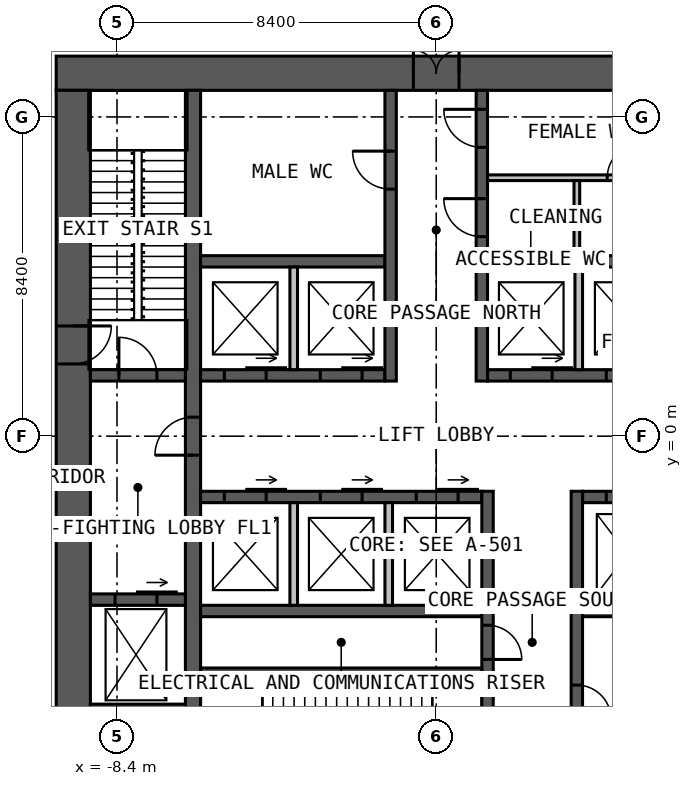
"""IFC4 building model, lengths in metres.
Left out: names, types, materials, properties, quantities, classifications, styles, units other than length and angle.
Written with IfcOpenShell. Run it as: python <this file> out.ifc"""

import sys

from ifc_helpers import new_model, si_unit, direction, frame, frame_2d, origin, place, context, subcontext, project, spatial, rectangle, extrude, element, fill, save


model = new_model("IFC4")
c1 = context("Model", 3, precision=1e-05, world=origin(), true_north=direction((0.0, 1.0)))
c2 = subcontext(c1, "Body", "Model", "MODEL_VIEW")
j1 = project(units=[si_unit("LENGTHUNIT", "METRE"), si_unit("PLANEANGLEUNIT", "RADIAN")], contexts=[c1])
p1 = place(None, origin())
s1 = spatial("IfcSite", under=j1, at=p1, CompositionType="ELEMENT")
p2 = place(p1, origin())
s2 = spatial("IfcBuilding", under=s1, at=p2, CompositionType="ELEMENT")
p3 = place(p2, origin())
s3 = spatial("IfcBuildingStorey", under=s2, at=p3, CompositionType="ELEMENT", Elevation=0.0)
p4 = place(p3, frame((-10.0, 9.55, 0.0), z_axis=(0.0, 0.0, 1.0), x_axis=(1.0, 0.0, 0.0)))
e1 = element("IfcWall", 1, at=p4, inside=s3, PredefinedType="SOLIDWALL", context=c2, shape_type="SweptSolid", body=[
    extrude(rectangle(XDim=20.0, YDim=0.9, at=frame_2d((10.0, 0.0))), origin(), (0.0, 0.0, 1.0), 6.0),
])
p5 = place(p4, frame((9.4, 0.0, 0.0)))
e2 = element("IfcOpeningElement", 2, at=p5, cuts=e1, PredefinedType="OPENING", context=c2, shape_type="SweptSolid", body=[
    extrude(rectangle(XDim=1.2, YDim=2.2, at=frame_2d((0.6, 1.1))), frame((0.0, 0.46, 0.0), z_axis=(0.0, -1.0, 0.0), x_axis=(1.0, 0.0, 0.0)), (0.0, 0.0, 1.0), 0.92),
])
p6 = place(p3, frame((-9.55, 9.1, 0.0), z_axis=(0.0, 0.0, 1.0), x_axis=(0.0, -1.0, 0.0)))
e3 = element("IfcWall", 3, at=p6, inside=s3, PredefinedType="SOLIDWALL", context=c2, shape_type="SweptSolid", body=[
    extrude(rectangle(XDim=18.2, YDim=0.9, at=frame_2d((9.1, 0.0))), origin(), (0.0, 0.0, 1.0), 6.0),
])
p7 = place(p6, frame((6.2, 0.0, 0.0)))
e4 = element("IfcOpeningElement", 4, at=p7, cuts=e3, PredefinedType="OPENING", context=c2, shape_type="SweptSolid", body=[
    extrude(rectangle(XDim=1.0, YDim=2.2, at=frame_2d((0.5, 1.1))), frame((0.0, 0.46, 0.0), z_axis=(0.0, -1.0, 0.0), x_axis=(1.0, 0.0, 0.0)), (0.0, 0.0, 1.0), 0.92),
])
p8 = place(p3, frame((-6.4, -9.1, 0.0), z_axis=(0.0, 0.0, 1.0), x_axis=(0.0, 1.0, 0.0)))
e5 = element("IfcWall", 5, at=p8, inside=s3, PredefinedType="SOLIDWALL", context=c2, shape_type="SweptSolid", body=[
    extrude(rectangle(XDim=18.2, YDim=0.4, at=frame_2d((9.1, 0.0))), origin(), (0.0, 0.0, 1.0), 6.0),
])
p9 = place(p8, frame((8.6, 0.0, 0.0)))
e6 = element("IfcOpeningElement", 6, at=p9, cuts=e5, PredefinedType="OPENING", context=c2, shape_type="SweptSolid", body=[
    extrude(rectangle(XDim=1.0, YDim=2.2, at=frame_2d((0.5, 1.1))), frame((0.0, 0.21, 0.0), z_axis=(0.0, -1.0, 0.0), x_axis=(1.0, 0.0, 0.0)), (0.0, 0.0, 1.0), 0.42),
])
p10 = place(p3, frame((-6.2, 1.6, 0.0), z_axis=(0.0, 0.0, 1.0), x_axis=(1.0, 0.0, 0.0)))
e7 = element("IfcWall", 7, at=p10, inside=s3, PredefinedType="SOLIDWALL", context=c2, shape_type="SweptSolid", body=[
    extrude(rectangle(XDim=4.85, YDim=0.3, at=frame_2d((2.425, 0.0))), origin(), (0.0, 0.0, 1.0), 6.0),
])
p11 = place(p10, frame((0.625, 0.0, 0.0)))
e8 = element("IfcOpeningElement", 8, at=p11, cuts=e7, PredefinedType="OPENING", context=c2, shape_type="SweptSolid", body=[
    extrude(rectangle(XDim=1.1, YDim=2.2, at=frame_2d((0.55, 1.1))), frame((0.0, 0.16, 0.0), z_axis=(0.0, -1.0, 0.0), x_axis=(1.0, 0.0, 0.0)), (0.0, 0.0, 1.0), 0.32),
])
p12 = place(p10, frame((3.15, 0.0, 0.0)))
e9 = element("IfcOpeningElement", 9, at=p12, cuts=e7, PredefinedType="OPENING", context=c2, shape_type="SweptSolid", body=[
    extrude(rectangle(XDim=1.1, YDim=2.2, at=frame_2d((0.55, 1.1))), frame((0.0, 0.16, 0.0), z_axis=(0.0, -1.0, 0.0), x_axis=(1.0, 0.0, 0.0)), (0.0, 0.0, 1.0), 0.32),
])
p13 = place(p3, frame((1.35, 1.6, 0.0), z_axis=(0.0, 0.0, 1.0), x_axis=(1.0, 0.0, 0.0)))
e10 = element("IfcWall", 10, at=p13, inside=s3, PredefinedType="SOLIDWALL", context=c2, shape_type="SweptSolid", body=[
    extrude(rectangle(XDim=4.85, YDim=0.3, at=frame_2d((2.425, 0.0))), origin(), (0.0, 0.0, 1.0), 6.0),
])
p14 = place(p13, frame((0.6, 0.0, 0.0)))
e11 = element("IfcOpeningElement", 11, at=p14, cuts=e10, PredefinedType="OPENING", context=c2, shape_type="SweptSolid", body=[
    extrude(rectangle(XDim=1.1, YDim=2.2, at=frame_2d((0.55, 1.1))), frame((0.0, 0.16, 0.0), z_axis=(0.0, -1.0, 0.0), x_axis=(1.0, 0.0, 0.0)), (0.0, 0.0, 1.0), 0.32),
])
p15 = place(p13, frame((3.125, 0.0, 0.0)))
e12 = element("IfcOpeningElement", 12, at=p15, cuts=e10, PredefinedType="OPENING", context=c2, shape_type="SweptSolid", body=[
    extrude(rectangle(XDim=1.1, YDim=2.2, at=frame_2d((0.55, 1.1))), frame((0.0, 0.16, 0.0), z_axis=(0.0, -1.0, 0.0), x_axis=(1.0, 0.0, 0.0)), (0.0, 0.0, 1.0), 0.32),
])
for number, where, z_axis, x_axis in (
    (13, (-6.2, 4.6, 0.0), (0.0, 0.0, 1.0), (1.0, 0.0, 0.0)),
    (14, (1.35, 4.6, 0.0), (0.0, 0.0, 1.0), (1.0, 0.0, 0.0)),
):
    element("IfcWall", number, at=place(p3, frame(where, z_axis=z_axis, x_axis=x_axis)), inside=s3, PredefinedType="SOLIDWALL", context=c2, shape_type="SweptSolid", body=[
        extrude(rectangle(XDim=4.85, YDim=0.3, at=frame_2d((2.425, 0.0))), origin(), (0.0, 0.0, 1.0), 6.0),
    ])
p16 = place(p3, frame((-1.2, 1.45, 0.0), z_axis=(0.0, 0.0, 1.0), x_axis=(0.0, 1.0, 0.0)))
e15 = element("IfcWall", 15, at=p16, inside=s3, PredefinedType="SOLIDWALL", context=c2, shape_type="SweptSolid", body=[
    extrude(rectangle(XDim=7.65, YDim=0.3, at=frame_2d((3.825, 0.0))), origin(), (0.0, 0.0, 1.0), 6.0),
])
p17 = place(p16, frame((5.05, 0.0, 0.0)))
e16 = element("IfcOpeningElement", 16, at=p17, cuts=e15, PredefinedType="OPENING", context=c2, shape_type="SweptSolid", body=[
    extrude(rectangle(XDim=1.0, YDim=2.2, at=frame_2d((0.5, 1.1))), frame((0.0, 0.16, 0.0), z_axis=(0.0, -1.0, 0.0), x_axis=(1.0, 0.0, 0.0)), (0.0, 0.0, 1.0), 0.32),
])
p18 = place(p3, frame((1.2, 1.45, 0.0), z_axis=(0.0, 0.0, 1.0), x_axis=(0.0, 1.0, 0.0)))
e17 = element("IfcWall", 17, at=p18, inside=s3, PredefinedType="SOLIDWALL", context=c2, shape_type="SweptSolid", body=[
    extrude(rectangle(XDim=7.65, YDim=0.3, at=frame_2d((3.825, 0.0))), origin(), (0.0, 0.0, 1.0), 6.0),
])
p19 = place(p18, frame((3.8, 0.0, 0.0)))
e18 = element("IfcOpeningElement", 18, at=p19, cuts=e17, PredefinedType="OPENING", context=c2, shape_type="SweptSolid", body=[
    extrude(rectangle(XDim=1.0, YDim=2.2, at=frame_2d((0.5, 1.1))), frame((0.0, 0.16, 0.0), z_axis=(0.0, -1.0, 0.0), x_axis=(1.0, 0.0, 0.0)), (0.0, 0.0, 1.0), 0.32),
])
p20 = place(p18, frame((6.15, 0.0, 0.0)))
e19 = element("IfcOpeningElement", 19, at=p20, cuts=e17, PredefinedType="OPENING", context=c2, shape_type="SweptSolid", body=[
    extrude(rectangle(XDim=1.0, YDim=2.2, at=frame_2d((0.5, 1.1))), frame((0.0, 0.16, 0.0), z_axis=(0.0, -1.0, 0.0), x_axis=(1.0, 0.0, 0.0)), (0.0, 0.0, 1.0), 0.32),
])
p21 = place(p3, frame((-6.2, -1.6, 0.0), z_axis=(0.0, 0.0, 1.0), x_axis=(1.0, 0.0, 0.0)))
e20 = element("IfcWall", 20, at=p21, inside=s3, PredefinedType="SOLIDWALL", context=c2, shape_type="SweptSolid", body=[
    extrude(rectangle(XDim=7.4, YDim=0.3, at=frame_2d((3.7, 0.0))), origin(), (0.0, 0.0, 1.0), 6.0),
])
p22 = place(p21, frame((0.625, 0.0, 0.0)))
e21 = element("IfcOpeningElement", 21, at=p22, cuts=e20, PredefinedType="OPENING", context=c2, shape_type="SweptSolid", body=[
    extrude(rectangle(XDim=1.1, YDim=2.2, at=frame_2d((0.55, 1.1))), frame((0.0, 0.16, 0.0), z_axis=(0.0, -1.0, 0.0), x_axis=(1.0, 0.0, 0.0)), (0.0, 0.0, 1.0), 0.32),
])
p23 = place(p21, frame((3.15, 0.0, 0.0)))
e22 = element("IfcOpeningElement", 22, at=p23, cuts=e20, PredefinedType="OPENING", context=c2, shape_type="SweptSolid", body=[
    extrude(rectangle(XDim=1.1, YDim=2.2, at=frame_2d((0.55, 1.1))), frame((0.0, 0.16, 0.0), z_axis=(0.0, -1.0, 0.0), x_axis=(1.0, 0.0, 0.0)), (0.0, 0.0, 1.0), 0.32),
])
p24 = place(p21, frame((5.675, 0.0, 0.0)))
e23 = element("IfcOpeningElement", 23, at=p24, cuts=e20, PredefinedType="OPENING", context=c2, shape_type="SweptSolid", body=[
    extrude(rectangle(XDim=1.1, YDim=2.2, at=frame_2d((0.55, 1.1))), frame((0.0, 0.16, 0.0), z_axis=(0.0, -1.0, 0.0), x_axis=(1.0, 0.0, 0.0)), (0.0, 0.0, 1.0), 0.32),
])
p25 = place(p3, frame((3.85, -1.6, 0.0), z_axis=(0.0, 0.0, 1.0), x_axis=(1.0, 0.0, 0.0)))
e24 = element("IfcWall", 24, at=p25, inside=s3, PredefinedType="SOLIDWALL", context=c2, shape_type="SweptSolid", body=[
    extrude(rectangle(XDim=2.35, YDim=0.3, at=frame_2d((1.175, 0.0))), origin(), (0.0, 0.0, 1.0), 6.0),
])
p26 = place(p25, frame((0.625, 0.0, 0.0)))
e25 = element("IfcOpeningElement", 25, at=p26, cuts=e24, PredefinedType="OPENING", context=c2, shape_type="SweptSolid", body=[
    extrude(rectangle(XDim=1.1, YDim=2.2, at=frame_2d((0.55, 1.1))), frame((0.0, 0.16, 0.0), z_axis=(0.0, -1.0, 0.0), x_axis=(1.0, 0.0, 0.0)), (0.0, 0.0, 1.0), 0.32),
])
p27 = place(p3, frame((-6.2, -4.6, 0.0), z_axis=(0.0, 0.0, 1.0), x_axis=(1.0, 0.0, 0.0)))
e26 = element("IfcWall", 26, at=p27, inside=s3, PredefinedType="SOLIDWALL", context=c2, shape_type="SweptSolid", body=[
    extrude(rectangle(XDim=7.4, YDim=0.3, at=frame_2d((3.7, 0.0))), origin(), (0.0, 0.0, 1.0), 6.0),
])
p28 = place(p3, frame((3.85, -4.6, 0.0), z_axis=(0.0, 0.0, 1.0), x_axis=(1.0, 0.0, 0.0)))
e27 = element("IfcWall", 27, at=p28, inside=s3, PredefinedType="SOLIDWALL", context=c2, shape_type="SweptSolid", body=[
    extrude(rectangle(XDim=2.35, YDim=0.3, at=frame_2d((1.175, 0.0))), origin(), (0.0, 0.0, 1.0), 6.0),
])
p29 = place(p3, frame((1.35, -1.45, 0.0), z_axis=(0.0, 0.0, 1.0), x_axis=(0.0, -1.0, 0.0)))
e28 = element("IfcWall", 28, at=p29, inside=s3, PredefinedType="SOLIDWALL", context=c2, shape_type="SweptSolid", body=[
    extrude(rectangle(XDim=7.65, YDim=0.3, at=frame_2d((3.825, 0.0))), origin(), (0.0, 0.0, 1.0), 6.0),
])
p30 = place(p29, frame((5.75, 0.0, 0.0)))
e29 = element("IfcOpeningElement", 29, at=p30, cuts=e28, PredefinedType="OPENING", context=c2, shape_type="SweptSolid", body=[
    extrude(rectangle(XDim=1.0, YDim=2.2, at=frame_2d((0.5, 1.1))), frame((0.0, 0.16, 0.0), z_axis=(0.0, -1.0, 0.0), x_axis=(1.0, 0.0, 0.0)), (0.0, 0.0, 1.0), 0.32),
])
p31 = place(p29, frame((3.525, 0.0, 0.0)))
e30 = element("IfcOpeningElement", 30, at=p31, cuts=e28, PredefinedType="OPENING", context=c2, shape_type="SweptSolid", body=[
    extrude(rectangle(XDim=0.9, YDim=2.2, at=frame_2d((0.45, 1.1))), frame((0.0, 0.16, 0.0), z_axis=(0.0, -1.0, 0.0), x_axis=(1.0, 0.0, 0.0)), (0.0, 0.0, 1.0), 0.32),
])
p32 = place(p3, frame((3.7, -1.45, 0.0), z_axis=(0.0, 0.0, 1.0), x_axis=(0.0, -1.0, 0.0)))
e31 = element("IfcWall", 31, at=p32, inside=s3, PredefinedType="SOLIDWALL", context=c2, shape_type="SweptSolid", body=[
    extrude(rectangle(XDim=7.65, YDim=0.3, at=frame_2d((3.825, 0.0))), origin(), (0.0, 0.0, 1.0), 6.0),
])
p33 = place(p32, frame((5.1, 0.0, 0.0)))
e32 = element("IfcOpeningElement", 32, at=p33, cuts=e31, PredefinedType="OPENING", context=c2, shape_type="SweptSolid", body=[
    extrude(rectangle(XDim=0.9, YDim=2.2, at=frame_2d((0.45, 1.1))), frame((0.0, 0.16, 0.0), z_axis=(0.0, -1.0, 0.0), x_axis=(1.0, 0.0, 0.0)), (0.0, 0.0, 1.0), 0.32),
])
p34 = place(p3, frame((-6.2, -6.2, 0.0), z_axis=(0.0, 0.0, 1.0), x_axis=(1.0, 0.0, 0.0)))
e33 = element("IfcWall", 33, at=p34, inside=s3, PredefinedType="SOLIDWALL", context=c2, shape_type="SweptSolid", body=[
    extrude(rectangle(XDim=7.4, YDim=0.2, at=frame_2d((3.7, 0.0))), origin(), (0.0, 0.0, 1.0), 6.0),
])
p35 = place(p3, frame((-9.1, 1.6, 0.0), z_axis=(0.0, 0.0, 1.0), x_axis=(1.0, 0.0, 0.0)))
e34 = element("IfcWall", 34, at=p35, inside=s3, PredefinedType="SOLIDWALL", context=c2, shape_type="SweptSolid", body=[
    extrude(rectangle(XDim=2.5, YDim=0.3, at=frame_2d((1.25, 0.0))), origin(), (0.0, 0.0, 1.0), 6.0),
])
p36 = place(p35, frame((0.75, 0.0, 0.0)))
e35 = element("IfcOpeningElement", 35, at=p36, cuts=e34, PredefinedType="OPENING", context=c2, shape_type="SweptSolid", body=[
    extrude(rectangle(XDim=1.0, YDim=2.2, at=frame_2d((0.5, 1.1))), frame((0.0, 0.16, 0.0), z_axis=(0.0, -1.0, 0.0), x_axis=(1.0, 0.0, 0.0)), (0.0, 0.0, 1.0), 0.32),
])
p37 = place(p3, frame((-9.1, -4.3, 0.0), z_axis=(0.0, 0.0, 1.0), x_axis=(1.0, 0.0, 0.0)))
e36 = element("IfcWall", 36, at=p37, inside=s3, PredefinedType="SOLIDWALL", context=c2, shape_type="SweptSolid", body=[
    extrude(rectangle(XDim=2.5, YDim=0.3, at=frame_2d((1.25, 0.0))), origin(), (0.0, 0.0, 1.0), 6.0),
])
p38 = place(p37, frame((0.65, 0.0, 0.0)))
e37 = element("IfcOpeningElement", 37, at=p38, cuts=e36, PredefinedType="OPENING", context=c2, shape_type="SweptSolid", body=[
    extrude(rectangle(XDim=1.1, YDim=2.2, at=frame_2d((0.55, 1.1))), frame((0.0, 0.16, 0.0), z_axis=(0.0, -1.0, 0.0), x_axis=(1.0, 0.0, 0.0)), (0.0, 0.0, 1.0), 0.32),
])
p39 = place(p3, frame((-9.1, -7.2, 0.0), z_axis=(0.0, 0.0, 1.0), x_axis=(1.0, 0.0, 0.0)))
e38 = element("IfcWall", 38, at=p39, inside=s3, PredefinedType="SOLIDWALL", context=c2, shape_type="SweptSolid", body=[
    extrude(rectangle(XDim=2.5, YDim=0.3, at=frame_2d((1.25, 0.0))), origin(), (0.0, 0.0, 1.0), 6.0),
])
for number, where, z_axis, x_axis in (
    (39, (-3.75, 1.75, 0.0), (0.0, 0.0, 1.0), (0.0, 1.0, 0.0)),
    (40, (3.75, 1.75, 0.0), (0.0, 0.0, 1.0), (0.0, 1.0, 0.0)),
    (41, (-3.75, -1.75, 0.0), (0.0, 0.0, 1.0), (0.0, -1.0, 0.0)),
    (42, (-1.25, -1.75, 0.0), (0.0, 0.0, 1.0), (0.0, -1.0, 0.0)),
):
    element("IfcWall", number, at=place(p3, frame(where, z_axis=z_axis, x_axis=x_axis)), inside=s3, PredefinedType="SOLIDWALL", context=c2, shape_type="SweptSolid", body=[
        extrude(rectangle(XDim=2.7, YDim=0.2, at=frame_2d((1.35, 0.0))), origin(), (0.0, 0.0, 1.0), 5.75),
    ])
p40 = place(p3, frame((1.35, 6.8, 0.0), z_axis=(0.0, 0.0, 1.0), x_axis=(1.0, 0.0, 0.0)))
e43 = element("IfcWall", 43, at=p40, inside=s3, PredefinedType="PARTITIONING", context=c2, shape_type="SweptSolid", body=[
    extrude(rectangle(XDim=4.85, YDim=0.15, at=frame_2d((2.425, 0.0))), origin(), (0.0, 0.0, 1.0), 5.75),
])
p41 = place(p40, frame((3.15, 0.0, 0.0)))
e44 = element("IfcOpeningElement", 44, at=p41, cuts=e43, PredefinedType="OPENING", context=c2, shape_type="SweptSolid", body=[
    extrude(rectangle(XDim=0.9, YDim=2.2, at=frame_2d((0.45, 1.1))), frame((0.0, 0.085, 0.0), z_axis=(0.0, -1.0, 0.0), x_axis=(1.0, 0.0, 0.0)), (0.0, 0.0, 1.0), 0.17),
])
p42 = place(p3, frame((3.7, 4.75, 0.0), z_axis=(0.0, 0.0, 1.0), x_axis=(0.0, 1.0, 0.0)))
e45 = element("IfcWall", 45, at=p42, inside=s3, PredefinedType="PARTITIONING", context=c2, shape_type="SweptSolid", body=[
    extrude(rectangle(XDim=1.975, YDim=0.15, at=frame_2d((0.988, 0.0))), origin(), (0.0, 0.0, 1.0), 5.75),
])
p43 = place(p5, origin())
e46 = element("IfcDoor", 46, at=p43, inside=s3, OperationType="DOUBLE_DOOR_SINGLE_SWING", PredefinedType="DOOR", context=c2, shape_type="SweptSolid", body=[
    extrude(rectangle(XDim=1.2, YDim=2.2, at=frame_2d((0.6, 1.1))), frame((0.0, 0.025, 0.0), z_axis=(0.0, -1.0, 0.0), x_axis=(1.0, 0.0, 0.0)), (0.0, 0.0, 1.0), 0.05),
])
fill(e2, e46)
p44 = place(p9, origin())
e47 = element("IfcDoor", 47, at=p44, inside=s3, OperationType="SINGLE_SWING_LEFT", PredefinedType="DOOR", context=c2, shape_type="SweptSolid", body=[
    extrude(rectangle(XDim=1.0, YDim=2.2, at=frame_2d((0.5, 1.1))), frame((0.0, 0.025, 0.0), z_axis=(0.0, -1.0, 0.0), x_axis=(1.0, 0.0, 0.0)), (0.0, 0.0, 1.0), 0.05),
])
fill(e6, e47)
p45 = place(p36, origin())
e48 = element("IfcDoor", 48, at=p45, inside=s3, OperationType="SINGLE_SWING_LEFT", PredefinedType="DOOR", context=c2, shape_type="SweptSolid", body=[
    extrude(rectangle(XDim=1.0, YDim=2.2, at=frame_2d((0.5, 1.1))), frame((0.0, 0.025, 0.0), z_axis=(0.0, -1.0, 0.0), x_axis=(1.0, 0.0, 0.0)), (0.0, 0.0, 1.0), 0.05),
])
fill(e35, e48)
p46 = place(p7, origin())
e49 = element("IfcDoor", 49, at=p46, inside=s3, OperationType="SINGLE_SWING_LEFT", PredefinedType="DOOR", context=c2, shape_type="SweptSolid", body=[
    extrude(rectangle(XDim=1.0, YDim=2.2, at=frame_2d((0.5, 1.1))), frame((0.0, 0.025, 0.0), z_axis=(0.0, -1.0, 0.0), x_axis=(1.0, 0.0, 0.0)), (0.0, 0.0, 1.0), 0.05),
])
fill(e4, e49)
p47 = place(p17, origin())
e50 = element("IfcDoor", 50, at=p47, inside=s3, OperationType="SINGLE_SWING_RIGHT", PredefinedType="DOOR", context=c2, shape_type="SweptSolid", body=[
    extrude(rectangle(XDim=1.0, YDim=2.2, at=frame_2d((0.5, 1.1))), frame((0.0, 0.025, 0.0), z_axis=(0.0, -1.0, 0.0), x_axis=(1.0, 0.0, 0.0)), (0.0, 0.0, 1.0), 0.05),
])
fill(e16, e50)
p48 = place(p19, origin())
e51 = element("IfcDoor", 51, at=p48, inside=s3, OperationType="SINGLE_SWING_RIGHT", PredefinedType="DOOR", context=c2, shape_type="SweptSolid", body=[
    extrude(rectangle(XDim=1.0, YDim=2.2, at=frame_2d((0.5, 1.1))), frame((0.0, 0.025, 0.0), z_axis=(0.0, -1.0, 0.0), x_axis=(1.0, 0.0, 0.0)), (0.0, 0.0, 1.0), 0.05),
])
fill(e18, e51)
p49 = place(p20, origin())
e52 = element("IfcDoor", 52, at=p49, inside=s3, OperationType="SINGLE_SWING_RIGHT", PredefinedType="DOOR", context=c2, shape_type="SweptSolid", body=[
    extrude(rectangle(XDim=1.0, YDim=2.2, at=frame_2d((0.5, 1.1))), frame((0.0, 0.025, 0.0), z_axis=(0.0, -1.0, 0.0), x_axis=(1.0, 0.0, 0.0)), (0.0, 0.0, 1.0), 0.05),
])
fill(e19, e52)
p50 = place(p31, origin())
e53 = element("IfcDoor", 53, at=p50, inside=s3, OperationType="SINGLE_SWING_RIGHT", PredefinedType="DOOR", context=c2, shape_type="SweptSolid", body=[
    extrude(rectangle(XDim=0.9, YDim=2.2, at=frame_2d((0.45, 1.1))), frame((0.0, 0.025, 0.0), z_axis=(0.0, -1.0, 0.0), x_axis=(1.0, 0.0, 0.0)), (0.0, 0.0, 1.0), 0.05),
])
fill(e30, e53)
p51 = place(p33, origin())
e54 = element("IfcDoor", 54, at=p51, inside=s3, OperationType="SINGLE_SWING_RIGHT", PredefinedType="DOOR", context=c2, shape_type="SweptSolid", body=[
    extrude(rectangle(XDim=0.9, YDim=2.2, at=frame_2d((0.45, 1.1))), frame((0.0, 0.025, 0.0), z_axis=(0.0, -1.0, 0.0), x_axis=(1.0, 0.0, 0.0)), (0.0, 0.0, 1.0), 0.05),
])
fill(e32, e54)
p52 = place(p41, origin())
e55 = element("IfcDoor", 55, at=p52, inside=s3, OperationType="SINGLE_SWING_RIGHT", PredefinedType="DOOR", context=c2, shape_type="SweptSolid", body=[
    extrude(rectangle(XDim=0.9, YDim=2.2, at=frame_2d((0.45, 1.1))), frame((0.0, 0.025, 0.0), z_axis=(0.0, -1.0, 0.0), x_axis=(1.0, 0.0, 0.0)), (0.0, 0.0, 1.0), 0.05),
])
fill(e44, e55)
p53 = place(p11, origin())
e56 = element("IfcDoor", 56, at=p53, inside=s3, OperationType="SLIDING_TO_LEFT", PredefinedType="DOOR", context=c2, shape_type="SweptSolid", body=[
    extrude(rectangle(XDim=1.1, YDim=2.2, at=frame_2d((0.55, 1.1))), frame((0.0, 0.025, 0.0), z_axis=(0.0, -1.0, 0.0), x_axis=(1.0, 0.0, 0.0)), (0.0, 0.0, 1.0), 0.05),
])
fill(e8, e56)
p54 = place(p12, origin())
e57 = element("IfcDoor", 57, at=p54, inside=s3, OperationType="SLIDING_TO_LEFT", PredefinedType="DOOR", context=c2, shape_type="SweptSolid", body=[
    extrude(rectangle(XDim=1.1, YDim=2.2, at=frame_2d((0.55, 1.1))), frame((0.0, 0.025, 0.0), z_axis=(0.0, -1.0, 0.0), x_axis=(1.0, 0.0, 0.0)), (0.0, 0.0, 1.0), 0.05),
])
fill(e9, e57)
p55 = place(p14, origin())
e58 = element("IfcDoor", 58, at=p55, inside=s3, OperationType="SLIDING_TO_LEFT", PredefinedType="DOOR", context=c2, shape_type="SweptSolid", body=[
    extrude(rectangle(XDim=1.1, YDim=2.2, at=frame_2d((0.55, 1.1))), frame((0.0, 0.025, 0.0), z_axis=(0.0, -1.0, 0.0), x_axis=(1.0, 0.0, 0.0)), (0.0, 0.0, 1.0), 0.05),
])
fill(e11, e58)
p56 = place(p15, origin())
e59 = element("IfcDoor", 59, at=p56, inside=s3, OperationType="SLIDING_TO_LEFT", PredefinedType="DOOR", context=c2, shape_type="SweptSolid", body=[
    extrude(rectangle(XDim=1.1, YDim=2.2, at=frame_2d((0.55, 1.1))), frame((0.0, 0.025, 0.0), z_axis=(0.0, -1.0, 0.0), x_axis=(1.0, 0.0, 0.0)), (0.0, 0.0, 1.0), 0.05),
])
fill(e12, e59)
p57 = place(p22, origin())
e60 = element("IfcDoor", 60, at=p57, inside=s3, OperationType="SLIDING_TO_LEFT", PredefinedType="DOOR", context=c2, shape_type="SweptSolid", body=[
    extrude(rectangle(XDim=1.1, YDim=2.2, at=frame_2d((0.55, 1.1))), frame((0.0, 0.025, 0.0), z_axis=(0.0, -1.0, 0.0), x_axis=(1.0, 0.0, 0.0)), (0.0, 0.0, 1.0), 0.05),
])
fill(e21, e60)
p58 = place(p23, origin())
e61 = element("IfcDoor", 61, at=p58, inside=s3, OperationType="SLIDING_TO_LEFT", PredefinedType="DOOR", context=c2, shape_type="SweptSolid", body=[
    extrude(rectangle(XDim=1.1, YDim=2.2, at=frame_2d((0.55, 1.1))), frame((0.0, 0.025, 0.0), z_axis=(0.0, -1.0, 0.0), x_axis=(1.0, 0.0, 0.0)), (0.0, 0.0, 1.0), 0.05),
])
fill(e22, e61)
p59 = place(p24, origin())
e62 = element("IfcDoor", 62, at=p59, inside=s3, OperationType="SLIDING_TO_LEFT", PredefinedType="DOOR", context=c2, shape_type="SweptSolid", body=[
    extrude(rectangle(XDim=1.1, YDim=2.2, at=frame_2d((0.55, 1.1))), frame((0.0, 0.025, 0.0), z_axis=(0.0, -1.0, 0.0), x_axis=(1.0, 0.0, 0.0)), (0.0, 0.0, 1.0), 0.05),
])
fill(e23, e62)
p60 = place(p26, origin())
e63 = element("IfcDoor", 63, at=p60, inside=s3, OperationType="SLIDING_TO_LEFT", PredefinedType="DOOR", context=c2, shape_type="SweptSolid", body=[
    extrude(rectangle(XDim=1.1, YDim=2.2, at=frame_2d((0.55, 1.1))), frame((0.0, 0.025, 0.0), z_axis=(0.0, -1.0, 0.0), x_axis=(1.0, 0.0, 0.0)), (0.0, 0.0, 1.0), 0.05),
])
fill(e25, e63)
p61 = place(p38, origin())
e64 = element("IfcDoor", 64, at=p61, inside=s3, OperationType="SLIDING_TO_LEFT", PredefinedType="DOOR", context=c2, shape_type="SweptSolid", body=[
    extrude(rectangle(XDim=1.1, YDim=2.2, at=frame_2d((0.55, 1.1))), frame((0.0, 0.025, 0.0), z_axis=(0.0, -1.0, 0.0), x_axis=(1.0, 0.0, 0.0)), (0.0, 0.0, 1.0), 0.05),
])
fill(e37, e64)
save(model, sys.argv[1])
